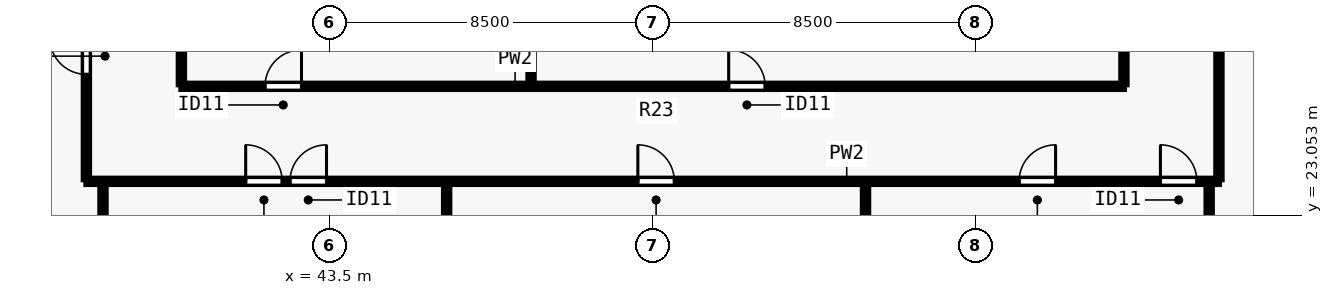
"""IFC4 building model, lengths in metres.
Left out: names, types, materials, properties, quantities, classifications, styles, units other than length and angle.
Written with IfcOpenShell. Run it as: python <this file> out.ifc"""

import sys

from ifc_helpers import new_model, si_unit, direction, frame, frame_2d, origin, place, context, subcontext, project, spatial, rectangle, extrude, element, fill, save


model = new_model("IFC4")
c1 = context("Model", 3, precision=1e-05, world=origin(), true_north=direction((0.0, 1.0)))
c2 = subcontext(c1, "Body", "Model", "MODEL_VIEW")
j1 = project(units=[si_unit("LENGTHUNIT", "METRE"), si_unit("PLANEANGLEUNIT", "RADIAN")], contexts=[c1])
p1 = place(None, origin())
s1 = spatial("IfcSite", under=j1, at=p1, CompositionType="ELEMENT")
p2 = place(p1, origin())
s2 = spatial("IfcBuilding", under=s1, at=p2, CompositionType="ELEMENT")
p3 = place(p2, frame((0.0, 0.0, 58.5)))
s3 = spatial("IfcBuildingStorey", under=s2, at=p3, CompositionType="ELEMENT", Elevation=58.5)
p4 = place(p3, frame((37.1, 23.95, 0.0), z_axis=(0.0, 0.0, 1.0), x_axis=(1.0, 0.0, 0.0)))
e1 = element("IfcWall", 1, at=p4, inside=s3, PredefinedType="PARTITIONING", context=c2, shape_type="SweptSolid", body=[
    extrude(rectangle(XDim=29.8, YDim=0.14, at=frame_2d((14.9, 0.0))), origin(), (0.0, 0.0, 1.0), 3.28),
])
p5 = place(p4, frame((4.191, 0.0, 0.0)))
e2 = element("IfcOpeningElement", 2, at=p5, cuts=e1, PredefinedType="OPENING", context=c2, shape_type="SweptSolid", body=[
    extrude(rectangle(XDim=0.96, YDim=2.12, at=frame_2d((0.48, 1.06))), frame((0.0, 0.08, 0.0), z_axis=(0.0, -1.0, 0.0), x_axis=(1.0, 0.0, 0.0)), (0.0, 0.0, 1.0), 0.16),
])
p6 = place(p4, frame((5.358, 0.0, 0.0)))
e3 = element("IfcOpeningElement", 3, at=p6, cuts=e1, PredefinedType="OPENING", context=c2, shape_type="SweptSolid", body=[
    extrude(rectangle(XDim=0.96, YDim=2.12, at=frame_2d((0.48, 1.06))), frame((0.0, 0.08, 0.0), z_axis=(0.0, -1.0, 0.0), x_axis=(1.0, 0.0, 0.0)), (0.0, 0.0, 1.0), 0.16),
])
p7 = place(p4, frame((14.51, 0.0, 0.0)))
e4 = element("IfcOpeningElement", 4, at=p7, cuts=e1, PredefinedType="OPENING", context=c2, shape_type="SweptSolid", body=[
    extrude(rectangle(XDim=0.96, YDim=2.12, at=frame_2d((0.48, 1.06))), frame((0.0, 0.08, 0.0), z_axis=(0.0, -1.0, 0.0), x_axis=(1.0, 0.0, 0.0)), (0.0, 0.0, 1.0), 0.16),
])
p8 = place(p4, frame((24.542, 0.0, 0.0)))
e5 = element("IfcOpeningElement", 5, at=p8, cuts=e1, PredefinedType="OPENING", context=c2, shape_type="SweptSolid", body=[
    extrude(rectangle(XDim=0.96, YDim=2.12, at=frame_2d((0.48, 1.06))), frame((0.0, 0.08, 0.0), z_axis=(0.0, -1.0, 0.0), x_axis=(1.0, 0.0, 0.0)), (0.0, 0.0, 1.0), 0.16),
])
p9 = place(p4, frame((28.26, 0.0, 0.0)))
e6 = element("IfcOpeningElement", 6, at=p9, cuts=e1, PredefinedType="OPENING", context=c2, shape_type="SweptSolid", body=[
    extrude(rectangle(XDim=0.96, YDim=2.12, at=frame_2d((0.48, 1.06))), frame((0.0, 0.08, 0.0), z_axis=(0.0, -1.0, 0.0), x_axis=(1.0, 0.0, 0.0)), (0.0, 0.0, 1.0), 0.16),
])
p10 = place(p3, frame((37.1, 24.005, 0.0), z_axis=(0.0, 0.0, 1.0), x_axis=(0.0, 1.0, 0.0)))
e7 = element("IfcWall", 7, at=p10, inside=s3, PredefinedType="PARTITIONING", context=c2, shape_type="SweptSolid", body=[
    extrude(rectangle(XDim=29.99, YDim=0.14, at=frame_2d((14.995, 0.0))), origin(), (0.0, 0.0, 1.0), 3.28),
])
p11 = place(p10, frame((2.76, 0.0, 0.0)))
e8 = element("IfcOpeningElement", 8, at=p11, cuts=e7, PredefinedType="OPENING", context=c2, shape_type="SweptSolid", body=[
    extrude(rectangle(XDim=0.96, YDim=2.12, at=frame_2d((0.48, 1.06))), frame((0.0, 0.08, 0.0), z_axis=(0.0, -1.0, 0.0), x_axis=(1.0, 0.0, 0.0)), (0.0, 0.0, 1.0), 0.16),
])
p12 = place(p10, frame((8.598, 0.0, 0.0)))
e9 = element("IfcOpeningElement", 9, at=p12, cuts=e7, PredefinedType="OPENING", context=c2, shape_type="SweptSolid", body=[
    extrude(rectangle(XDim=0.96, YDim=2.12, at=frame_2d((0.48, 1.06))), frame((0.0, 0.08, 0.0), z_axis=(0.0, -1.0, 0.0), x_axis=(1.0, 0.0, 0.0)), (0.0, 0.0, 1.0), 0.16),
])
p13 = place(p10, frame((14.578, 0.0, 0.0)))
e10 = element("IfcOpeningElement", 10, at=p13, cuts=e7, PredefinedType="OPENING", context=c2, shape_type="SweptSolid", body=[
    extrude(rectangle(XDim=0.96, YDim=2.12, at=frame_2d((0.48, 1.06))), frame((0.0, 0.08, 0.0), z_axis=(0.0, -1.0, 0.0), x_axis=(1.0, 0.0, 0.0)), (0.0, 0.0, 1.0), 0.16),
])
p14 = place(p10, frame((20.558, 0.0, 0.0)))
e11 = element("IfcOpeningElement", 11, at=p14, cuts=e7, PredefinedType="OPENING", context=c2, shape_type="SweptSolid", body=[
    extrude(rectangle(XDim=0.96, YDim=2.12, at=frame_2d((0.48, 1.06))), frame((0.0, 0.08, 0.0), z_axis=(0.0, -1.0, 0.0), x_axis=(1.0, 0.0, 0.0)), (0.0, 0.0, 1.0), 0.16),
])
p15 = place(p10, frame((26.333, 0.0, 0.0)))
e12 = element("IfcOpeningElement", 12, at=p15, cuts=e7, PredefinedType="OPENING", context=c2, shape_type="SweptSolid", body=[
    extrude(rectangle(XDim=0.96, YDim=2.12, at=frame_2d((0.48, 1.06))), frame((0.0, 0.08, 0.0), z_axis=(0.0, -1.0, 0.0), x_axis=(1.0, 0.0, 0.0)), (0.0, 0.0, 1.0), 0.16),
])
p16 = place(p3, frame((66.9, 24.005, 0.0), z_axis=(0.0, 0.0, 1.0), x_axis=(0.0, 1.0, 0.0)))
e13 = element("IfcWall", 13, at=p16, inside=s3, PredefinedType="PARTITIONING", context=c2, shape_type="SweptSolid", body=[
    extrude(rectangle(XDim=29.99, YDim=0.14, at=frame_2d((14.995, 0.0))), origin(), (0.0, 0.0, 1.0), 3.28),
])
p17 = place(p16, frame((4.344, 0.0, 0.0)))
e14 = element("IfcOpeningElement", 14, at=p17, cuts=e13, PredefinedType="OPENING", context=c2, shape_type="SweptSolid", body=[
    extrude(rectangle(XDim=0.96, YDim=2.12, at=frame_2d((0.48, 1.06))), frame((0.0, 0.08, 0.0), z_axis=(0.0, -1.0, 0.0), x_axis=(1.0, 0.0, 0.0)), (0.0, 0.0, 1.0), 0.16),
])
p18 = place(p16, frame((14.452, 0.0, 0.0)))
e15 = element("IfcOpeningElement", 15, at=p18, cuts=e13, PredefinedType="OPENING", context=c2, shape_type="SweptSolid", body=[
    extrude(rectangle(XDim=0.96, YDim=2.12, at=frame_2d((0.48, 1.06))), frame((0.0, 0.08, 0.0), z_axis=(0.0, -1.0, 0.0), x_axis=(1.0, 0.0, 0.0)), (0.0, 0.0, 1.0), 0.16),
])
p19 = place(p16, frame((24.623, 0.0, 0.0)))
e16 = element("IfcOpeningElement", 16, at=p19, cuts=e13, PredefinedType="OPENING", context=c2, shape_type="SweptSolid", body=[
    extrude(rectangle(XDim=0.96, YDim=2.12, at=frame_2d((0.48, 1.06))), frame((0.0, 0.08, 0.0), z_axis=(0.0, -1.0, 0.0), x_axis=(1.0, 0.0, 0.0)), (0.0, 0.0, 1.0), 0.16),
])
p20 = place(p3, frame((39.6, 26.45, 0.0), z_axis=(0.0, 0.0, 1.0), x_axis=(1.0, 0.0, 0.0)))
e17 = element("IfcWall", 17, at=p20, inside=s3, PredefinedType="PARTITIONING", context=c2, shape_type="SweptSolid", body=[
    extrude(rectangle(XDim=24.8, YDim=0.14, at=frame_2d((12.4, 0.0))), origin(), (0.0, 0.0, 1.0), 3.28),
])
p21 = place(p20, frame((2.2, 0.0, 0.0)))
e18 = element("IfcOpeningElement", 18, at=p21, cuts=e17, PredefinedType="OPENING", context=c2, shape_type="SweptSolid", body=[
    extrude(rectangle(XDim=0.96, YDim=2.12, at=frame_2d((0.48, 1.06))), frame((0.0, 0.08, 0.0), z_axis=(0.0, -1.0, 0.0), x_axis=(1.0, 0.0, 0.0)), (0.0, 0.0, 1.0), 0.16),
])
p22 = place(p20, frame((14.4, 0.0, 0.0)))
e19 = element("IfcOpeningElement", 19, at=p22, cuts=e17, PredefinedType="OPENING", context=c2, shape_type="SweptSolid", body=[
    extrude(rectangle(XDim=0.96, YDim=2.12, at=frame_2d((0.48, 1.06))), frame((0.0, 0.08, 0.0), z_axis=(0.0, -1.0, 0.0), x_axis=(1.0, 0.0, 0.0)), (0.0, 0.0, 1.0), 0.16),
])
p23 = place(p3, frame((39.6, 26.505, 0.0), z_axis=(0.0, 0.0, 1.0), x_axis=(0.0, 1.0, 0.0)))
e20 = element("IfcWall", 20, at=p23, inside=s3, PredefinedType="PARTITIONING", context=c2, shape_type="SweptSolid", body=[
    extrude(rectangle(XDim=12.245, YDim=0.14, at=frame_2d((6.123, 0.0))), origin(), (0.0, 0.0, 1.0), 3.28),
])
p24 = place(p23, frame((1.045, 0.0, 0.0)))
e21 = element("IfcOpeningElement", 21, at=p24, cuts=e20, PredefinedType="OPENING", context=c2, shape_type="SweptSolid", body=[
    extrude(rectangle(XDim=0.88, YDim=2.1, at=frame_2d((0.44, 1.05))), frame((0.0, 0.08, 0.0), z_axis=(0.0, -1.0, 0.0), x_axis=(1.0, 0.0, 0.0)), (0.0, 0.0, 1.0), 0.16),
])
p25 = place(p23, frame((9.295, 0.0, 0.0)))
e22 = element("IfcOpeningElement", 22, at=p25, cuts=e20, PredefinedType="OPENING", context=c2, shape_type="SweptSolid", body=[
    extrude(rectangle(XDim=0.88, YDim=2.1, at=frame_2d((0.44, 1.05))), frame((0.0, 0.08, 0.0), z_axis=(0.0, -1.0, 0.0), x_axis=(1.0, 0.0, 0.0)), (0.0, 0.0, 1.0), 0.16),
])
p26 = place(p3, frame((64.4, 26.505, 0.0), z_axis=(0.0, 0.0, 1.0), x_axis=(0.0, 1.0, 0.0)))
e23 = element("IfcWall", 23, at=p26, inside=s3, PredefinedType="PARTITIONING", context=c2, shape_type="SweptSolid", body=[
    extrude(rectangle(XDim=12.245, YDim=0.14, at=frame_2d((6.123, 0.0))), origin(), (0.0, 0.0, 1.0), 3.28),
])
p27 = place(p26, frame((2.445, 0.0, 0.0)))
e24 = element("IfcOpeningElement", 24, at=p27, cuts=e23, PredefinedType="OPENING", context=c2, shape_type="SweptSolid", body=[
    extrude(rectangle(XDim=0.88, YDim=2.1, at=frame_2d((0.44, 1.05))), frame((0.0, 0.08, 0.0), z_axis=(0.0, -1.0, 0.0), x_axis=(1.0, 0.0, 0.0)), (0.0, 0.0, 1.0), 0.16),
])
p28 = place(p3, frame((48.8, 26.505, 0.0), z_axis=(0.0, 0.0, 1.0), x_axis=(0.0, 1.0, 0.0)))
e25 = element("IfcWall", 25, at=p28, inside=s3, PredefinedType="PARTITIONING", context=c2, shape_type="SweptSolid", body=[
    extrude(rectangle(XDim=3.735, YDim=0.14, at=frame_2d((1.868, 0.0))), origin(), (0.0, 0.0, 1.0), 3.28),
])
p29 = place(p3, frame((37.537, 13.92, 0.0), z_axis=(0.0, 0.0, 1.0), x_axis=(0.0, 1.0, 0.0)))
e26 = element("IfcWall", 26, at=p29, inside=s3, PredefinedType="PARTITIONING", context=c2, shape_type="SweptSolid", body=[
    extrude(rectangle(XDim=9.93, YDim=0.14, at=frame_2d((4.965, 0.0))), origin(), (0.0, 0.0, 1.0), 2.439),
])
for number, where, z_axis, x_axis in (
    (27, (46.579, 13.92, 0.0), (0.0, 0.0, 1.0), (0.0, 1.0, 0.0)),
    (28, (57.601, 13.92, 0.0), (0.0, 0.0, 1.0), (0.0, 1.0, 0.0)),
):
    element("IfcWall", number, at=place(p3, frame(where, z_axis=z_axis, x_axis=x_axis)), inside=s3, PredefinedType="PARTITIONING", context=c2, shape_type="SweptSolid", body=[
        extrude(rectangle(XDim=9.93, YDim=0.14, at=frame_2d((4.965, 0.0))), origin(), (0.0, 0.0, 1.0), 3.28),
    ])
p30 = place(p3, frame((66.643, 13.92, 0.0), z_axis=(0.0, 0.0, 1.0), x_axis=(0.0, 1.0, 0.0)))
e29 = element("IfcWall", 29, at=p30, inside=s3, PredefinedType="PARTITIONING", context=c2, shape_type="SweptSolid", body=[
    extrude(rectangle(XDim=9.93, YDim=0.14, at=frame_2d((4.965, 0.0))), origin(), (0.0, 0.0, 1.0), 2.439),
])
p31 = place(p21, origin())
e30 = element("IfcDoor", 30, at=p31, inside=s3, OperationType="SINGLE_SWING_RIGHT", PredefinedType="DOOR", context=c2, shape_type="SweptSolid", body=[
    extrude(rectangle(XDim=0.96, YDim=2.12, at=frame_2d((0.48, 1.06))), frame((0.0, 0.025, 0.0), z_axis=(0.0, -1.0, 0.0), x_axis=(1.0, 0.0, 0.0)), (0.0, 0.0, 1.0), 0.05),
])
fill(e18, e30)
p32 = place(p22, origin())
e31 = element("IfcDoor", 31, at=p32, inside=s3, OperationType="SINGLE_SWING_LEFT", PredefinedType="DOOR", context=c2, shape_type="SweptSolid", body=[
    extrude(rectangle(XDim=0.96, YDim=2.12, at=frame_2d((0.48, 1.06))), frame((0.0, 0.025, 0.0), z_axis=(0.0, -1.0, 0.0), x_axis=(1.0, 0.0, 0.0)), (0.0, 0.0, 1.0), 0.05),
])
fill(e19, e31)
p33 = place(p5, origin())
e32 = element("IfcDoor", 32, at=p33, inside=s3, OperationType="SINGLE_SWING_LEFT", PredefinedType="DOOR", context=c2, shape_type="SweptSolid", body=[
    extrude(rectangle(XDim=0.96, YDim=2.12, at=frame_2d((0.48, 1.06))), frame((0.0, 0.025, 0.0), z_axis=(0.0, -1.0, 0.0), x_axis=(1.0, 0.0, 0.0)), (0.0, 0.0, 1.0), 0.05),
])
fill(e2, e32)
p34 = place(p6, origin())
e33 = element("IfcDoor", 33, at=p34, inside=s3, OperationType="SINGLE_SWING_RIGHT", PredefinedType="DOOR", context=c2, shape_type="SweptSolid", body=[
    extrude(rectangle(XDim=0.96, YDim=2.12, at=frame_2d((0.48, 1.06))), frame((0.0, 0.025, 0.0), z_axis=(0.0, -1.0, 0.0), x_axis=(1.0, 0.0, 0.0)), (0.0, 0.0, 1.0), 0.05),
])
fill(e3, e33)
p35 = place(p7, origin())
e34 = element("IfcDoor", 34, at=p35, inside=s3, OperationType="SINGLE_SWING_LEFT", PredefinedType="DOOR", context=c2, shape_type="SweptSolid", body=[
    extrude(rectangle(XDim=0.96, YDim=2.12, at=frame_2d((0.48, 1.06))), frame((0.0, 0.025, 0.0), z_axis=(0.0, -1.0, 0.0), x_axis=(1.0, 0.0, 0.0)), (0.0, 0.0, 1.0), 0.05),
])
fill(e4, e34)
p36 = place(p8, origin())
e35 = element("IfcDoor", 35, at=p36, inside=s3, OperationType="SINGLE_SWING_RIGHT", PredefinedType="DOOR", context=c2, shape_type="SweptSolid", body=[
    extrude(rectangle(XDim=0.96, YDim=2.12, at=frame_2d((0.48, 1.06))), frame((0.0, 0.025, 0.0), z_axis=(0.0, -1.0, 0.0), x_axis=(1.0, 0.0, 0.0)), (0.0, 0.0, 1.0), 0.05),
])
fill(e5, e35)
p37 = place(p9, origin())
e36 = element("IfcDoor", 36, at=p37, inside=s3, OperationType="SINGLE_SWING_LEFT", PredefinedType="DOOR", context=c2, shape_type="SweptSolid", body=[
    extrude(rectangle(XDim=0.96, YDim=2.12, at=frame_2d((0.48, 1.06))), frame((0.0, 0.025, 0.0), z_axis=(0.0, -1.0, 0.0), x_axis=(1.0, 0.0, 0.0)), (0.0, 0.0, 1.0), 0.05),
])
fill(e6, e36)
p38 = place(p11, origin())
e37 = element("IfcDoor", 37, at=p38, inside=s3, OperationType="SINGLE_SWING_RIGHT", PredefinedType="DOOR", context=c2, shape_type="SweptSolid", body=[
    extrude(rectangle(XDim=0.96, YDim=2.12, at=frame_2d((0.48, 1.06))), frame((0.0, 0.025, 0.0), z_axis=(0.0, -1.0, 0.0), x_axis=(1.0, 0.0, 0.0)), (0.0, 0.0, 1.0), 0.05),
])
fill(e8, e37)
save(model, sys.argv[1])
